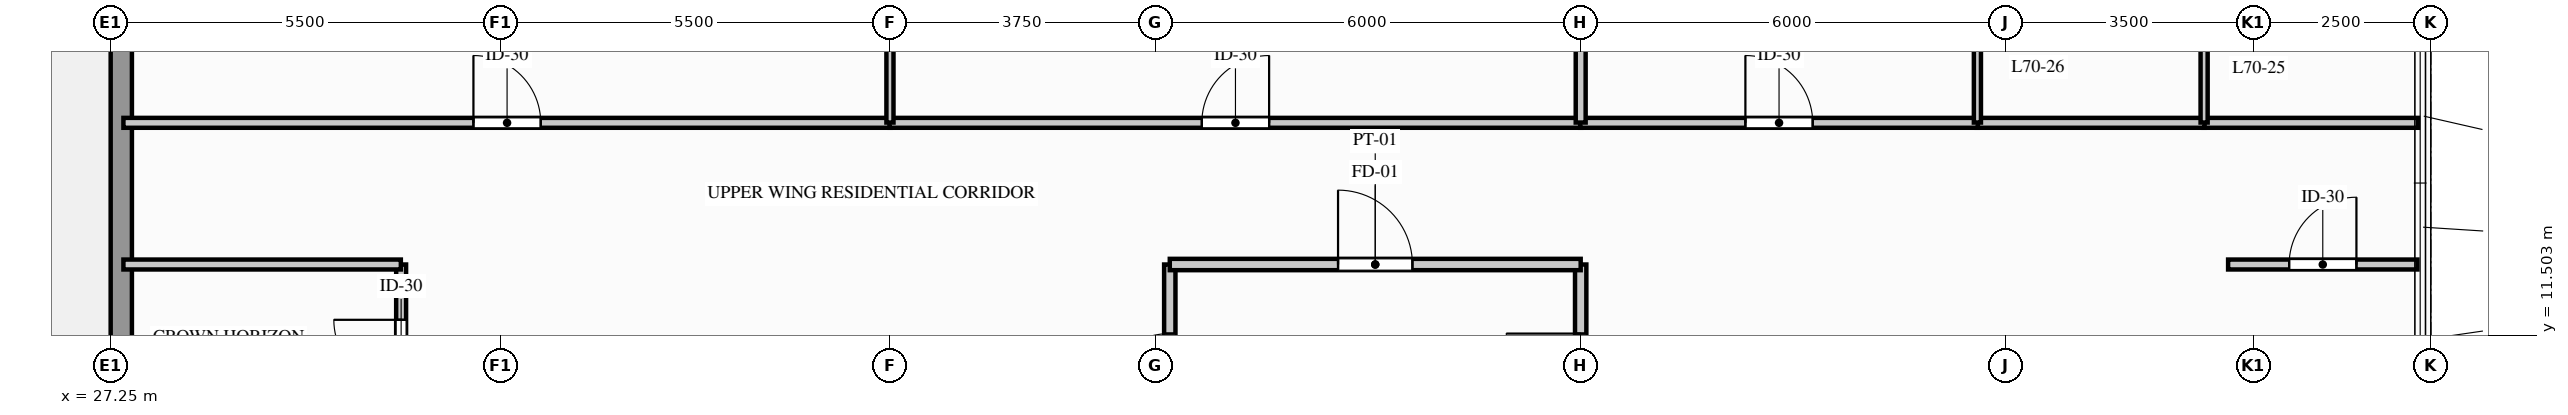
"""IFC4 building model, lengths in metres.
Left out: names, types, materials, properties, quantities, classifications, styles, units other than length and angle.
Written with IfcOpenShell. Run it as: python <this file> out.ifc"""

import sys

from ifc_helpers import new_model, si_unit, direction, frame, frame_2d, origin, place, context, subcontext, project, spatial, rectangle, extrude, element, fill, save


model = new_model("IFC4")
c1 = context("Model", 3, precision=1e-05, world=origin(), true_north=direction((0.0, 1.0)))
c2 = subcontext(c1, "Body", "Model", "MODEL_VIEW")
j1 = project(units=[si_unit("LENGTHUNIT", "METRE"), si_unit("PLANEANGLEUNIT", "RADIAN")], contexts=[c1])
p1 = place(None, origin())
s1 = spatial("IfcSite", under=j1, at=p1, CompositionType="ELEMENT")
p2 = place(p1, origin())
s2 = spatial("IfcBuilding", under=s1, at=p2, CompositionType="ELEMENT")
p3 = place(p2, frame((0.0, 0.0, 230.4)))
s3 = spatial("IfcBuildingStorey", under=s2, at=p3, CompositionType="ELEMENT", Elevation=230.4)
p4 = place(p3, frame((27.4, 24.0, 0.0), z_axis=(0.0, 0.0, 1.0), x_axis=(0.0, -1.0, 0.0)))
e1 = element("IfcWall", 1, at=p4, inside=s3, PredefinedType="STANDARD", context=c2, shape_type="SweptSolid", body=[
    extrude(rectangle(XDim=21.5, YDim=0.3, at=frame_2d((10.75, 0.0))), origin(), (0.0, 0.0, 1.0), 2.332),
])
p5 = place(p4, frame((5.5, 0.0, 0.0)))
e2 = element("IfcOpeningElement", 2, at=p5, cuts=e1, PredefinedType="OPENING", context=c2, shape_type="SweptSolid", body=[
    extrude(rectangle(XDim=1.1, YDim=2.2, at=frame_2d((0.55, 1.1))), frame((0.0, 0.16, 0.0), z_axis=(0.0, -1.0, 0.0), x_axis=(1.0, 0.0, 0.0)), (0.0, 0.0, 1.0), 0.32),
])
p6 = place(p4, frame((1.3, 0.0, 0.312)))
e3 = element("IfcOpeningElement", 3, at=p6, cuts=e1, PredefinedType="OPENING", context=c2, shape_type="SweptSolid", body=[
    extrude(rectangle(XDim=1.5, YDim=1.8, at=frame_2d((0.75, 0.9))), frame((0.0, 0.16, 0.0), z_axis=(0.0, -1.0, 0.0), x_axis=(1.0, 0.0, 0.0)), (0.0, 0.0, 1.0), 0.32),
])
p7 = place(p3, frame((31.35, 9.989, 0.0), z_axis=(0.0, 0.0, 1.0), x_axis=(0.0, 1.0, 0.0)))
e4 = element("IfcWall", 4, at=p7, inside=s3, PredefinedType="PARTITIONING", context=c2, shape_type="SweptSolid", body=[
    extrude(rectangle(XDim=2.511, YDim=0.14, at=frame_2d((1.256, 0.0))), origin(), (0.0, 0.0, 1.0), 2.326),
])
p8 = place(p7, frame((0.781, 0.0, 0.0)))
e5 = element("IfcOpeningElement", 5, at=p8, cuts=e4, PredefinedType="OPENING", context=c2, shape_type="SweptSolid", body=[
    extrude(rectangle(XDim=0.95, YDim=2.05, at=frame_2d((0.475, 1.025))), frame((0.0, 0.08, 0.0), z_axis=(0.0, -1.0, 0.0), x_axis=(1.0, 0.0, 0.0)), (0.0, 0.0, 1.0), 0.16),
])
p9 = place(p3, frame((42.2, 9.5, 0.0), z_axis=(0.0, 0.0, 1.0), x_axis=(0.0, 1.0, 0.0)))
e6 = element("IfcWall", 6, at=p9, inside=s3, PredefinedType="PARTITIONING", context=c2, shape_type="SweptSolid", body=[
    extrude(rectangle(XDim=3.0, YDim=0.16, at=frame_2d((1.5, 0.0))), origin(), (0.0, 0.0, 1.0), 2.326),
])
p10 = place(p9, frame((0.975, 0.0, 0.0)))
e7 = element("IfcOpeningElement", 7, at=p10, cuts=e6, PredefinedType="OPENING", context=c2, shape_type="SweptSolid", body=[
    extrude(rectangle(XDim=1.05, YDim=2.06, at=frame_2d((0.525, 1.03))), frame((0.0, 0.09, 0.0), z_axis=(0.0, -1.0, 0.0), x_axis=(1.0, 0.0, 0.0)), (0.0, 0.0, 1.0), 0.18),
])
p11 = place(p3, frame((48.0, 9.5, 0.0), z_axis=(0.0, 0.0, 1.0), x_axis=(0.0, 1.0, 0.0)))
e8 = element("IfcWall", 8, at=p11, inside=s3, PredefinedType="PARTITIONING", context=c2, shape_type="SweptSolid", body=[
    extrude(rectangle(XDim=3.0, YDim=0.16, at=frame_2d((1.5, 0.0))), origin(), (0.0, 0.0, 1.0), 2.326),
])
p12 = place(p11, frame((0.975, 0.0, 0.0)))
e9 = element("IfcOpeningElement", 9, at=p12, cuts=e8, PredefinedType="OPENING", context=c2, shape_type="SweptSolid", body=[
    extrude(rectangle(XDim=1.05, YDim=2.06, at=frame_2d((0.525, 1.03))), frame((0.0, 0.09, 0.0), z_axis=(0.0, -1.0, 0.0), x_axis=(1.0, 0.0, 0.0)), (0.0, 0.0, 1.0), 0.18),
])
p13 = place(p3, frame((42.2, 12.5, 0.0), z_axis=(0.0, 0.0, 1.0), x_axis=(1.0, 0.0, 0.0)))
e10 = element("IfcWall", 10, at=p13, inside=s3, PredefinedType="PARTITIONING", context=c2, shape_type="SweptSolid", body=[
    extrude(rectangle(XDim=5.8, YDim=0.16, at=frame_2d((2.9, 0.0))), origin(), (0.0, 0.0, 1.0), 2.326),
])
p14 = place(p13, frame((2.375, 0.0, 0.0)))
e11 = element("IfcOpeningElement", 11, at=p14, cuts=e10, PredefinedType="OPENING", context=c2, shape_type="SweptSolid", body=[
    extrude(rectangle(XDim=1.05, YDim=2.06, at=frame_2d((0.525, 1.03))), frame((0.0, 0.09, 0.0), z_axis=(0.0, -1.0, 0.0), x_axis=(1.0, 0.0, 0.0)), (0.0, 0.0, 1.0), 0.18),
])
p15 = place(p3, frame((57.139, 12.5, 0.0), z_axis=(0.0, 0.0, 1.0), x_axis=(1.0, 0.0, 0.0)))
e12 = element("IfcWall", 12, at=p15, inside=s3, PredefinedType="PARTITIONING", context=c2, shape_type="SweptSolid", body=[
    extrude(rectangle(XDim=2.673, YDim=0.14, at=frame_2d((1.336, 0.0))), origin(), (0.0, 0.0, 1.0), 2.89),
])
p16 = place(p15, frame((0.861, 0.0, 0.0)))
e13 = element("IfcOpeningElement", 13, at=p16, cuts=e12, PredefinedType="OPENING", context=c2, shape_type="SweptSolid", body=[
    extrude(rectangle(XDim=0.95, YDim=2.05, at=frame_2d((0.475, 1.025))), frame((0.0, 0.08, 0.0), z_axis=(0.0, -1.0, 0.0), x_axis=(1.0, 0.0, 0.0)), (0.0, 0.0, 1.0), 0.16),
])
p17 = place(p3, frame((27.43, 12.5, 0.0), z_axis=(0.0, 0.0, 1.0), x_axis=(1.0, 0.0, 0.0)))
e14 = element("IfcWall", 14, at=p17, inside=s3, PredefinedType="PARTITIONING", context=c2, shape_type="SweptSolid", body=[
    extrude(rectangle(XDim=3.916, YDim=0.14, at=frame_2d((1.958, 0.0))), origin(), (0.0, 0.0, 1.0), 2.89),
])
p18 = place(p3, frame((27.43, 14.5, 0.0), z_axis=(0.0, 0.0, 1.0), x_axis=(1.0, 0.0, 0.0)))
e15 = element("IfcWall", 15, at=p18, inside=s3, PredefinedType="PARTITIONING", context=c2, shape_type="SweptSolid", body=[
    extrude(rectangle(XDim=10.831, YDim=0.14, at=frame_2d((5.416, 0.0))), origin(), (0.0, 0.0, 1.0), 2.326),
])
p19 = place(p18, frame((4.941, 0.0, 0.0)))
e16 = element("IfcOpeningElement", 16, at=p19, cuts=e15, PredefinedType="OPENING", context=c2, shape_type="SweptSolid", body=[
    extrude(rectangle(XDim=0.95, YDim=2.05, at=frame_2d((0.475, 1.025))), frame((0.0, 0.08, 0.0), z_axis=(0.0, -1.0, 0.0), x_axis=(1.0, 0.0, 0.0)), (0.0, 0.0, 1.0), 0.16),
])
p20 = place(p3, frame((38.243, 14.5, 0.0), z_axis=(0.0, 0.0, 1.0), x_axis=(1.0, 0.0, 0.0)))
e17 = element("IfcWall", 17, at=p20, inside=s3, PredefinedType="PARTITIONING", context=c2, shape_type="SweptSolid", body=[
    extrude(rectangle(XDim=9.769, YDim=0.14, at=frame_2d((4.884, 0.0))), origin(), (0.0, 0.0, 1.0), 2.326),
])
p21 = place(p20, frame((4.409, 0.0, 0.0)))
e18 = element("IfcOpeningElement", 18, at=p21, cuts=e17, PredefinedType="OPENING", context=c2, shape_type="SweptSolid", body=[
    extrude(rectangle(XDim=0.95, YDim=2.05, at=frame_2d((0.475, 1.025))), frame((0.0, 0.08, 0.0), z_axis=(0.0, -1.0, 0.0), x_axis=(1.0, 0.0, 0.0)), (0.0, 0.0, 1.0), 0.16),
])
p22 = place(p3, frame((56.789, 14.5, 0.0), z_axis=(0.0, 0.0, 1.0), x_axis=(1.0, 0.0, 0.0)))
e19 = element("IfcWall", 19, at=p22, inside=s3, PredefinedType="PARTITIONING", context=c2, shape_type="SweptSolid", body=[
    extrude(rectangle(XDim=3.031, YDim=0.14, at=frame_2d((1.516, 0.0))), origin(), (0.0, 0.0, 1.0), 2.89),
])
p23 = place(p3, frame((53.589, 14.5, 0.0), z_axis=(0.0, 0.0, 1.0), x_axis=(1.0, 0.0, 0.0)))
e20 = element("IfcWall", 20, at=p23, inside=s3, PredefinedType="PARTITIONING", context=c2, shape_type="SweptSolid", body=[
    extrude(rectangle(XDim=3.219, YDim=0.14, at=frame_2d((1.609, 0.0))), origin(), (0.0, 0.0, 1.0), 2.326),
])
p24 = place(p3, frame((47.993, 14.5, 0.0), z_axis=(0.0, 0.0, 1.0), x_axis=(1.0, 0.0, 0.0)))
e21 = element("IfcWall", 21, at=p24, inside=s3, PredefinedType="PARTITIONING", context=c2, shape_type="SweptSolid", body=[
    extrude(rectangle(XDim=5.615, YDim=0.14, at=frame_2d((2.807, 0.0))), origin(), (0.0, 0.0, 1.0), 2.326),
])
p25 = place(p24, frame((2.332, 0.0, 0.0)))
e22 = element("IfcOpeningElement", 22, at=p25, cuts=e21, PredefinedType="OPENING", context=c2, shape_type="SweptSolid", body=[
    extrude(rectangle(XDim=0.95, YDim=2.05, at=frame_2d((0.475, 1.025))), frame((0.0, 0.08, 0.0), z_axis=(0.0, -1.0, 0.0), x_axis=(1.0, 0.0, 0.0)), (0.0, 0.0, 1.0), 0.16),
])
p26 = place(p3, frame((38.25, 14.504, 0.0), z_axis=(0.0, 0.0, 1.0), x_axis=(0.0, 1.0, 0.0)))
e23 = element("IfcWall", 23, at=p26, inside=s3, PredefinedType="PARTITIONING", context=c2, shape_type="SweptSolid", body=[
    extrude(rectangle(XDim=11.816, YDim=0.1, at=frame_2d((5.908, 0.0))), origin(), (0.0, 0.0, 1.0), 2.326),
])
p27 = place(p3, frame((48.0, 14.504, 0.0), z_axis=(0.0, 0.0, 1.0), x_axis=(0.0, 1.0, 0.0)))
e24 = element("IfcWall", 24, at=p27, inside=s3, PredefinedType="PARTITIONING", context=c2, shape_type="SweptSolid", body=[
    extrude(rectangle(XDim=7.253, YDim=0.14, at=frame_2d((3.627, 0.0))), origin(), (0.0, 0.0, 1.0), 2.326),
])
for number, where, z_axis, x_axis in (
    (25, (56.8, 14.504, 0.0), (0.0, 0.0, 1.0), (0.0, 1.0, 0.0)),
    (26, (53.6, 14.504, 0.0), (0.0, 0.0, 1.0), (0.0, 1.0, 0.0)),
):
    element("IfcWall", number, at=place(p3, frame(where, z_axis=z_axis, x_axis=x_axis)), inside=s3, PredefinedType="PARTITIONING", context=c2, shape_type="SweptSolid", body=[
        extrude(rectangle(XDim=2.346, YDim=0.1, at=frame_2d((1.173, 0.0))), origin(), (0.0, 0.0, 1.0), 2.326),
    ])
p28 = place(p8, origin())
e27 = element("IfcDoor", 27, at=p28, inside=s3, OperationType="SINGLE_SWING_RIGHT", PredefinedType="DOOR", context=c2, shape_type="SweptSolid", body=[
    extrude(rectangle(XDim=0.95, YDim=2.05, at=frame_2d((0.475, 1.025))), frame((0.0, 0.025, 0.0), z_axis=(0.0, -1.0, 0.0), x_axis=(1.0, 0.0, 0.0)), (0.0, 0.0, 1.0), 0.05),
])
fill(e5, e27)
p29 = place(p10, origin())
e28 = element("IfcDoor", 28, at=p29, inside=s3, OperationType="SINGLE_SWING_LEFT", PredefinedType="DOOR", context=c2, shape_type="SweptSolid", body=[
    extrude(rectangle(XDim=1.05, YDim=2.06, at=frame_2d((0.525, 1.03))), frame((0.0, 0.025, 0.0), z_axis=(0.0, -1.0, 0.0), x_axis=(1.0, 0.0, 0.0)), (0.0, 0.0, 1.0), 0.05),
])
fill(e7, e28)
p30 = place(p12, origin())
e29 = element("IfcDoor", 29, at=p30, inside=s3, OperationType="SINGLE_SWING_RIGHT", PredefinedType="DOOR", context=c2, shape_type="SweptSolid", body=[
    extrude(rectangle(XDim=1.05, YDim=2.06, at=frame_2d((0.525, 1.03))), frame((0.0, 0.025, 0.0), z_axis=(0.0, -1.0, 0.0), x_axis=(1.0, 0.0, 0.0)), (0.0, 0.0, 1.0), 0.05),
])
fill(e9, e29)
p31 = place(p14, origin())
e30 = element("IfcDoor", 30, at=p31, inside=s3, OperationType="SINGLE_SWING_LEFT", PredefinedType="DOOR", context=c2, shape_type="SweptSolid", body=[
    extrude(rectangle(XDim=1.05, YDim=2.06, at=frame_2d((0.525, 1.03))), frame((0.0, 0.025, 0.0), z_axis=(0.0, -1.0, 0.0), x_axis=(1.0, 0.0, 0.0)), (0.0, 0.0, 1.0), 0.05),
])
fill(e11, e30)
p32 = place(p16, origin())
e31 = element("IfcDoor", 31, at=p32, inside=s3, OperationType="SINGLE_SWING_RIGHT", PredefinedType="DOOR", context=c2, shape_type="SweptSolid", body=[
    extrude(rectangle(XDim=0.95, YDim=2.05, at=frame_2d((0.475, 1.025))), frame((0.0, 0.025, 0.0), z_axis=(0.0, -1.0, 0.0), x_axis=(1.0, 0.0, 0.0)), (0.0, 0.0, 1.0), 0.05),
])
fill(e13, e31)
p33 = place(p19, origin())
e32 = element("IfcDoor", 32, at=p33, inside=s3, OperationType="SINGLE_SWING_LEFT", PredefinedType="DOOR", context=c2, shape_type="SweptSolid", body=[
    extrude(rectangle(XDim=0.95, YDim=2.05, at=frame_2d((0.475, 1.025))), frame((0.0, 0.025, 0.0), z_axis=(0.0, -1.0, 0.0), x_axis=(1.0, 0.0, 0.0)), (0.0, 0.0, 1.0), 0.05),
])
fill(e16, e32)
p34 = place(p21, origin())
e33 = element("IfcDoor", 33, at=p34, inside=s3, OperationType="SINGLE_SWING_RIGHT", PredefinedType="DOOR", context=c2, shape_type="SweptSolid", body=[
    extrude(rectangle(XDim=0.95, YDim=2.05, at=frame_2d((0.475, 1.025))), frame((0.0, 0.025, 0.0), z_axis=(0.0, -1.0, 0.0), x_axis=(1.0, 0.0, 0.0)), (0.0, 0.0, 1.0), 0.05),
])
fill(e18, e33)
p35 = place(p25, origin())
e34 = element("IfcDoor", 34, at=p35, inside=s3, OperationType="SINGLE_SWING_LEFT", PredefinedType="DOOR", context=c2, shape_type="SweptSolid", body=[
    extrude(rectangle(XDim=0.95, YDim=2.05, at=frame_2d((0.475, 1.025))), frame((0.0, 0.025, 0.0), z_axis=(0.0, -1.0, 0.0), x_axis=(1.0, 0.0, 0.0)), (0.0, 0.0, 1.0), 0.05),
])
fill(e22, e34)
save(model, sys.argv[1])
